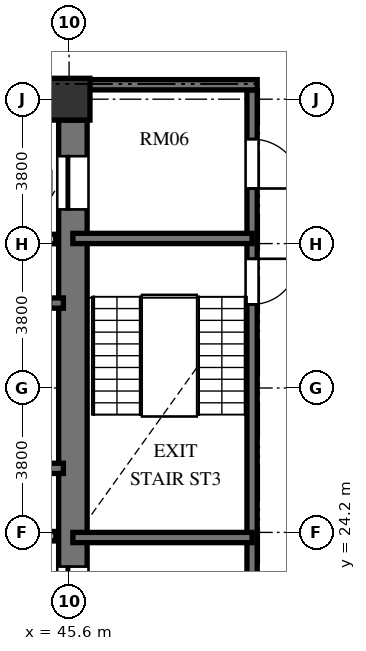
"""IFC4 building model, lengths in metres.
Left out: names, types, materials, properties, quantities, classifications, styles, units other than length and angle.
Written with IfcOpenShell. Run it as: python <this file> out.ifc"""

import sys

from ifc_helpers import new_model, si_unit, direction, frame, frame_2d, origin, origin_2d, place, context, subcontext, project, spatial, rectangle, extrude, element, fill, save


model = new_model("IFC4")
c1 = context("Model", 3, precision=1e-05, world=origin(), true_north=direction((0.0, 1.0)))
c2 = subcontext(c1, "Body", "Model", "MODEL_VIEW")
j1 = project(units=[si_unit("LENGTHUNIT", "METRE"), si_unit("PLANEANGLEUNIT", "RADIAN")], contexts=[c1])
p1 = place(None, origin())
s1 = spatial("IfcSite", under=j1, at=p1, CompositionType="ELEMENT")
p2 = place(p1, origin())
s2 = spatial("IfcBuilding", under=s1, at=p2, CompositionType="ELEMENT")
p3 = place(p2, frame((0.0, 0.0, 96.336)))
s3 = spatial("IfcBuildingStorey", under=s2, at=p3, CompositionType="ELEMENT", Elevation=96.336)
p4 = place(p3, frame((45.6, 35.6, 0.0), z_axis=(0.0, 0.0, 1.0), x_axis=(1.0, 0.0, 0.0)))
e1 = element("IfcColumn", 1, at=p4, inside=s3, PredefinedType="COLUMN", context=c2, shape_type="SweptSolid", body=[
    extrude(rectangle(XDim=1.1, YDim=1.1, at=origin_2d()), origin(), (0.0, 0.0, 1.0), 3.648),
])
p5 = place(p3, frame((45.7, 20.95, 0.0), z_axis=(0.0, 0.0, 1.0), x_axis=(0.0, 1.0, 0.0)))
e2 = element("IfcWall", 2, at=p5, inside=s3, PredefinedType="SHEAR", context=c2, shape_type="SweptSolid", body=[
    extrude(rectangle(XDim=14.1, YDim=0.75, at=frame_2d((7.05, 0.0))), origin(), (0.0, 0.0, 1.0), 3.648),
])
p6 = place(p5, frame((11.75, 0.0, 0.0)))
e3 = element("IfcOpeningElement", 3, at=p6, cuts=e2, PredefinedType="OPENING", context=c2, shape_type="SweptSolid", body=[
    extrude(rectangle(XDim=1.4, YDim=2.3, at=frame_2d((0.7, 1.15))), frame((0.0, 0.385, 0.0), z_axis=(0.0, -1.0, 0.0), x_axis=(1.0, 0.0, 0.0)), (0.0, 0.0, 1.0), 0.77),
])
p7 = place(p5, frame((0.95, 0.0, 0.0)))
e4 = element("IfcOpeningElement", 4, at=p7, cuts=e2, PredefinedType="OPENING", context=c2, shape_type="SweptSolid", body=[
    extrude(rectangle(XDim=1.4, YDim=2.3, at=frame_2d((0.7, 1.15))), frame((0.0, 0.385, 0.0), z_axis=(0.0, -1.0, 0.0), x_axis=(1.0, 0.0, 0.0)), (0.0, 0.0, 1.0), 0.77),
])
p8 = place(p3, frame((37.465, 30.235, 0.0), z_axis=(0.0, 0.0, 1.0), x_axis=(1.0, 0.0, 0.0)))
e5 = element("IfcWall", 5, at=p8, inside=s3, PredefinedType="SHEAR", context=c2, shape_type="SweptSolid", body=[
    extrude(rectangle(XDim=7.985, YDim=0.27, at=frame_2d((3.992, 0.0))), origin(), (0.0, 0.0, 1.0), 3.648),
])
p9 = place(p8, frame((6.455, 0.0, 0.0)))
e6 = element("IfcOpeningElement", 6, at=p9, cuts=e5, PredefinedType="OPENING", context=c2, shape_type="SweptSolid", body=[
    extrude(rectangle(XDim=1.2, YDim=2.15, at=frame_2d((0.6, 1.075))), frame((0.0, 0.145, 0.0), z_axis=(0.0, -1.0, 0.0), x_axis=(1.0, 0.0, 0.0)), (0.0, 0.0, 1.0), 0.29),
])
p10 = place(p3, frame((37.465, 25.885, 0.0), z_axis=(0.0, 0.0, 1.0), x_axis=(1.0, 0.0, 0.0)))
e7 = element("IfcWall", 7, at=p10, inside=s3, PredefinedType="SHEAR", context=c2, shape_type="SweptSolid", body=[
    extrude(rectangle(XDim=7.985, YDim=0.27, at=frame_2d((3.992, 0.0))), origin(), (0.0, 0.0, 1.0), 3.648),
])
for number, where, z_axis, x_axis in (
    (8, (42.95, 31.92, 0.0), (0.0, 0.0, 1.0), (1.0, 0.0, 0.0)),
    (9, (42.95, 24.1, 0.0), (0.0, 0.0, 1.0), (1.0, 0.0, 0.0)),
):
    element("IfcWall", number, at=place(p3, frame(where, z_axis=z_axis, x_axis=x_axis)), inside=s3, PredefinedType="SOLIDWALL", context=c2, shape_type="SweptSolid", body=[
        extrude(rectangle(XDim=2.3, YDim=0.25, at=frame_2d((1.15, 0.0))), origin(), (0.0, 0.0, 1.0), 3.428),
    ])
p11 = place(p3, frame((50.415, 35.845, 0.0), z_axis=(0.0, 0.0, 1.0), x_axis=(0.0, -1.0, 0.0)))
e10 = element("IfcWall", 10, at=p11, inside=s3, PredefinedType="SHEAR", context=c2, shape_type="SweptSolid", body=[
    extrude(rectangle(XDim=15.825, YDim=0.27, at=frame_2d((7.913, 0.0))), origin(), (0.0, 0.0, 1.0), 3.648),
])
p12 = place(p11, frame((4.445, 0.0, 0.0)))
e11 = element("IfcOpeningElement", 11, at=p12, cuts=e10, PredefinedType="OPENING", context=c2, shape_type="SweptSolid", body=[
    extrude(rectangle(XDim=1.2, YDim=2.15, at=frame_2d((0.6, 1.075))), frame((0.0, 0.145, 0.0), z_axis=(0.0, -1.0, 0.0), x_axis=(1.0, 0.0, 0.0)), (0.0, 0.0, 1.0), 0.29),
])
p13 = place(p11, frame((1.295, 0.0, 0.0)))
e12 = element("IfcOpeningElement", 12, at=p13, cuts=e10, PredefinedType="OPENING", context=c2, shape_type="SweptSolid", body=[
    extrude(rectangle(XDim=1.3, YDim=2.2, at=frame_2d((0.65, 1.1))), frame((0.0, 0.145, 0.0), z_axis=(0.0, -1.0, 0.0), x_axis=(1.0, 0.0, 0.0)), (0.0, 0.0, 1.0), 0.29),
])
p14 = place(p11, frame((13.095, 0.0, 0.0)))
e13 = element("IfcOpeningElement", 13, at=p14, cuts=e10, PredefinedType="OPENING", context=c2, shape_type="SweptSolid", body=[
    extrude(rectangle(XDim=1.3, YDim=2.2, at=frame_2d((0.65, 1.1))), frame((0.0, 0.145, 0.0), z_axis=(0.0, -1.0, 0.0), x_axis=(1.0, 0.0, 0.0)), (0.0, 0.0, 1.0), 0.29),
])
p15 = place(p3, frame((46.075, 35.98, 0.0), z_axis=(0.0, 0.0, 1.0), x_axis=(1.0, 0.0, 0.0)))
e14 = element("IfcWall", 14, at=p15, inside=s3, PredefinedType="SHEAR", context=c2, shape_type="SweptSolid", body=[
    extrude(rectangle(XDim=4.475, YDim=0.27, at=frame_2d((2.238, 0.0))), origin(), (0.0, 0.0, 1.0), 3.648),
])
for number, where, z_axis, x_axis in (
    (15, (45.7, 31.935, 0.0), (0.0, 0.0, 1.0), (1.0, 0.0, 0.0)),
    (16, (45.7, 24.065, 0.0), (0.0, 0.0, 1.0), (1.0, 0.0, 0.0)),
):
    element("IfcWall", number, at=place(p3, frame(where, z_axis=z_axis, x_axis=x_axis)), inside=s3, PredefinedType="SHEAR", context=c2, shape_type="SweptSolid", body=[
        extrude(rectangle(XDim=4.715, YDim=0.27, at=frame_2d((2.357, 0.0))), origin(), (0.0, 0.0, 1.0), 3.648),
    ])
p16 = place(p6, origin())
e17 = element("IfcDoor", 17, at=p16, inside=s3, OperationType="SLIDING_TO_LEFT", PredefinedType="DOOR", context=c2, shape_type="SweptSolid", body=[
    extrude(rectangle(XDim=1.4, YDim=2.3, at=frame_2d((0.7, 1.15))), frame((0.0, 0.025, 0.0), z_axis=(0.0, -1.0, 0.0), x_axis=(1.0, 0.0, 0.0)), (0.0, 0.0, 1.0), 0.05),
])
fill(e3, e17)
p17 = place(p7, origin())
e18 = element("IfcDoor", 18, at=p17, inside=s3, OperationType="SLIDING_TO_LEFT", PredefinedType="DOOR", context=c2, shape_type="SweptSolid", body=[
    extrude(rectangle(XDim=1.4, YDim=2.3, at=frame_2d((0.7, 1.15))), frame((0.0, 0.025, 0.0), z_axis=(0.0, -1.0, 0.0), x_axis=(1.0, 0.0, 0.0)), (0.0, 0.0, 1.0), 0.05),
])
fill(e4, e18)
p18 = place(p12, origin())
e19 = element("IfcDoor", 19, at=p18, inside=s3, OperationType="SINGLE_SWING_LEFT", PredefinedType="DOOR", context=c2, shape_type="SweptSolid", body=[
    extrude(rectangle(XDim=1.2, YDim=2.15, at=frame_2d((0.6, 1.075))), frame((0.0, 0.025, 0.0), z_axis=(0.0, -1.0, 0.0), x_axis=(1.0, 0.0, 0.0)), (0.0, 0.0, 1.0), 0.05),
])
fill(e11, e19)
p19 = place(p13, origin())
e20 = element("IfcDoor", 20, at=p19, inside=s3, OperationType="SINGLE_SWING_RIGHT", PredefinedType="DOOR", context=c2, shape_type="SweptSolid", body=[
    extrude(rectangle(XDim=1.3, YDim=2.2, at=frame_2d((0.65, 1.1))), frame((0.0, 0.025, 0.0), z_axis=(0.0, -1.0, 0.0), x_axis=(1.0, 0.0, 0.0)), (0.0, 0.0, 1.0), 0.05),
])
fill(e12, e20)
save(model, sys.argv[1])
